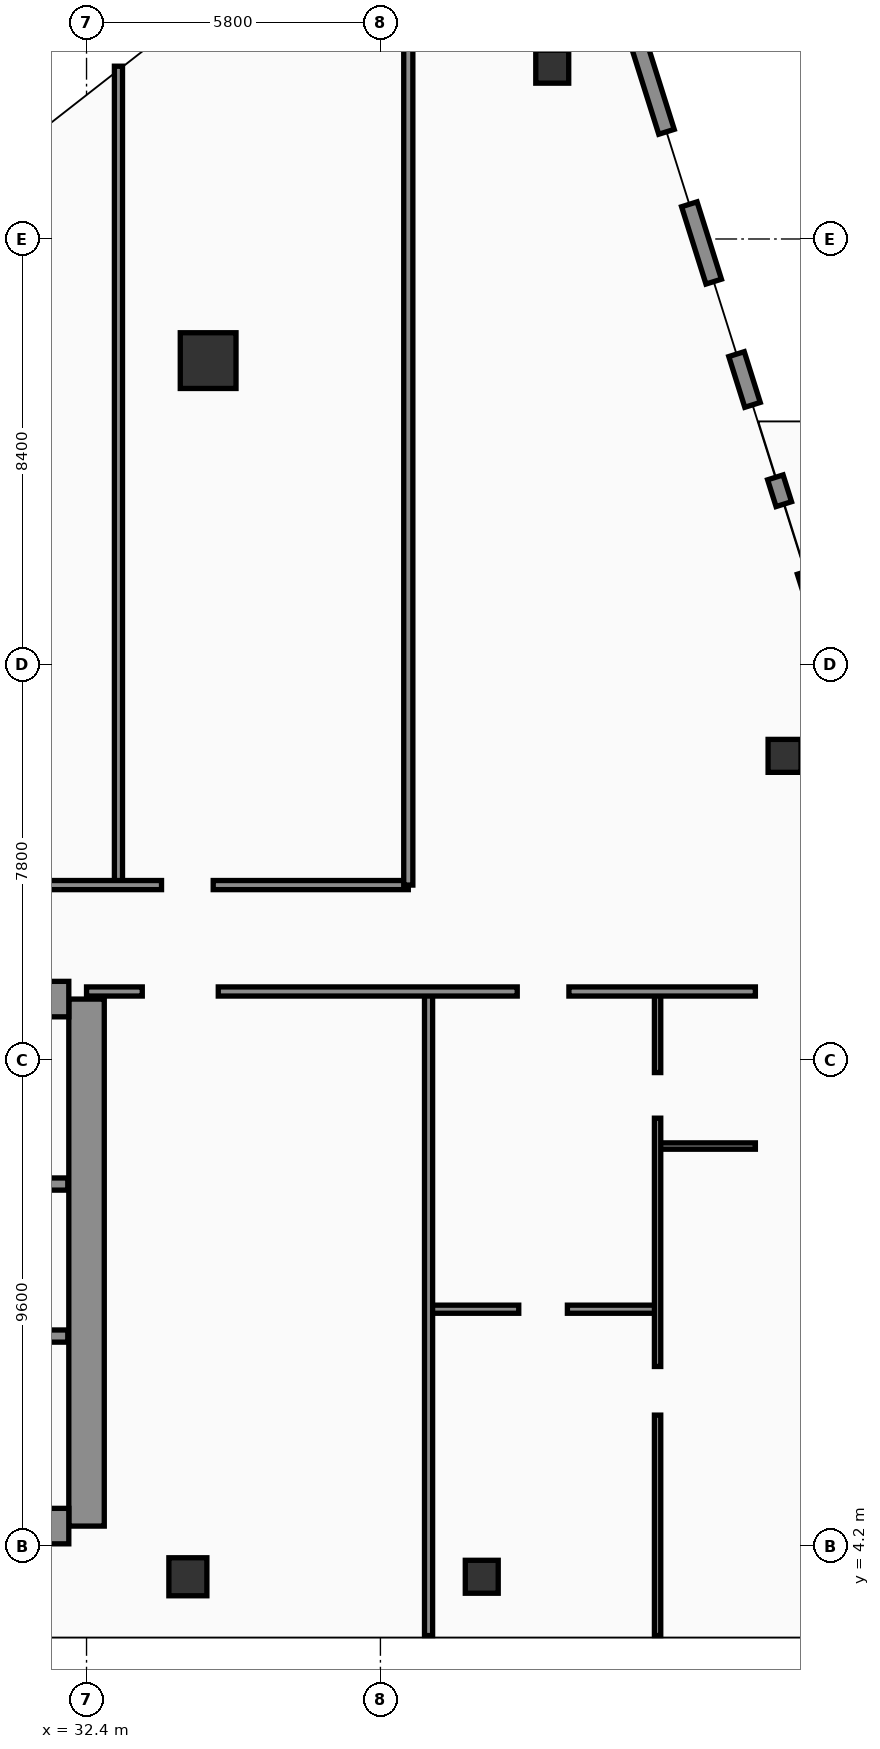
"""IFC4 building model, lengths in metres.
Left out: names, types, materials, properties, quantities, classifications, styles, units other than length and angle.
Written with IfcOpenShell. Run it as: python <this file> out.ifc"""

import sys

from ifc_helpers import new_model, si_unit, direction, frame, frame_2d, origin, origin_2d, place, context, subcontext, project, spatial, rectangle, hollow_rectangle, circle, extrude, element, fill, save


model = new_model("IFC4")
c1 = context("Model", 3, precision=1e-05, world=origin(), true_north=direction((0.0, 1.0)))
c2 = subcontext(c1, "Body", "Model", "MODEL_VIEW")
j1 = project(units=[si_unit("LENGTHUNIT", "METRE"), si_unit("PLANEANGLEUNIT", "RADIAN")], contexts=[c1])
p1 = place(None, origin())
s1 = spatial("IfcSite", under=j1, at=p1, CompositionType="ELEMENT")
p2 = place(p1, origin())
s2 = spatial("IfcBuilding", under=s1, at=p2, CompositionType="ELEMENT")
p3 = place(p2, frame((0.0, 0.0, 211.0)))
s3 = spatial("IfcBuildingStorey", under=s2, at=p3, CompositionType="ELEMENT", Elevation=211.0)
p4 = place(p3, frame((32.4, 4.6, 0.0), z_axis=(0.0, 0.0, 1.0), x_axis=(0.0, 1.0, 0.0)))
e1 = element("IfcWall", 1, at=p4, inside=s3, PredefinedType="SHEAR", context=c2, shape_type="SweptSolid", body=[
    extrude(rectangle(XDim=10.4, YDim=0.7, at=frame_2d((5.2, 0.0))), origin(), (0.0, 0.0, 1.0), 3.56),
])
p5 = place(p3, frame((21.95, 15.0, 0.0), z_axis=(0.0, 0.0, 1.0), x_axis=(1.0, 0.0, 0.0)))
e2 = element("IfcWall", 2, at=p5, inside=s3, PredefinedType="SHEAR", context=c2, shape_type="SweptSolid", body=[
    extrude(rectangle(XDim=10.1, YDim=0.7, at=frame_2d((5.05, 0.0))), origin(), (0.0, 0.0, 1.0), 3.56),
])
p6 = place(p5, frame((4.95, 0.0, 0.0)))
e3 = element("IfcOpeningElement", 3, at=p6, cuts=e2, PredefinedType="OPENING", context=c2, shape_type="SweptSolid", body=[
    extrude(rectangle(XDim=1.1, YDim=2.2, at=frame_2d((0.55, 1.1))), frame((0.0, 0.36, 0.0), z_axis=(0.0, -1.0, 0.0), x_axis=(1.0, 0.0, 0.0)), (0.0, 0.0, 1.0), 0.72),
])
p7 = place(p3, frame((21.95, 4.6, 0.0), z_axis=(0.0, 0.0, 1.0), x_axis=(1.0, 0.0, 0.0)))
e4 = element("IfcWall", 4, at=p7, inside=s3, PredefinedType="SHEAR", context=c2, shape_type="SweptSolid", body=[
    extrude(rectangle(XDim=10.1, YDim=0.7, at=frame_2d((5.05, 0.0))), origin(), (0.0, 0.0, 1.0), 3.56),
])
p8 = place(p3, frame((34.4, 3.6, 0.0), z_axis=(0.0, 0.0, 1.0), x_axis=(1.0, 0.0, 0.0)))
e5 = element("IfcColumn", 5, at=p8, inside=s3, PredefinedType="COLUMN", context=c2, shape_type="SweptSolid", body=[
    extrude(hollow_rectangle(XDim=0.75, YDim=0.75, WallThickness=0.032, at=origin_2d()), origin(), (0.0, 0.0, 1.0), 3.56),
])
p9 = place(p3, frame((40.2, 3.6, 0.0), z_axis=(0.0, 0.0, 1.0), x_axis=(1.0, 0.0, 0.0)))
e6 = element("IfcColumn", 6, at=p9, inside=s3, PredefinedType="COLUMN", context=c2, shape_type="SweptSolid", body=[
    extrude(hollow_rectangle(XDim=0.65, YDim=0.65, WallThickness=0.028, at=origin_2d()), origin(), (0.0, 0.0, 1.0), 3.56),
])
p10 = place(p3, frame((34.8, 27.6, 0.0), z_axis=(0.0, 0.0, 1.0), x_axis=(1.0, 0.0, 0.0)))
e7 = element("IfcColumn", 7, at=p10, inside=s3, PredefinedType="COLUMN", context=c2, shape_type="SweptSolid", body=[
    extrude(circle(Radius=0.55, at=origin_2d()), origin(), (0.0, 0.0, 1.0), 3.56),
])
for number, where, z_axis, x_axis in (
    (8, (46.176, 19.8, 0.0), (0.0, 0.0, 1.0), (1.0, 0.0, 0.0)),
    (9, (41.591, 33.4, 0.0), (0.0, 0.0, 1.0), (1.0, 0.0, 0.0)),
):
    element("IfcColumn", number, at=place(p3, frame(where, z_axis=z_axis, x_axis=x_axis)), inside=s3, PredefinedType="COLUMN", context=c2, shape_type="SweptSolid", body=[
        extrude(hollow_rectangle(XDim=0.65, YDim=0.65, WallThickness=0.028, at=origin_2d()), origin(), (0.0, 0.0, 1.0), 3.56),
    ])
p11 = place(p3, frame((52.23, 5.505, 0.0), z_axis=(0.0, 0.0, 1.0), x_axis=(-0.300509063924, 0.953778958931, 0.0)))
e10 = element("IfcWall", 10, at=p11, inside=s3, PredefinedType="SOLIDWALL", context=c2, shape_type="SweptSolid", body=[
    extrude(rectangle(XDim=30.814, YDim=0.32, at=frame_2d((15.407, 0.0))), origin(), (0.0, 0.0, 1.0), 3.56),
])
p12 = place(p11, frame((18.796, 0.0, 0.0)))
e11 = element("IfcOpeningElement", 11, at=p12, cuts=e10, PredefinedType="OPENING", context=c2, shape_type="SweptSolid", body=[
    extrude(rectangle(XDim=1.4, YDim=2.25, at=frame_2d((0.7, 1.125))), frame((0.0, 0.17, 0.0), z_axis=(0.0, -1.0, 0.0), x_axis=(1.0, 0.0, 0.0)), (0.0, 0.0, 1.0), 0.34),
])
p13 = place(p11, frame((4.437, 0.0, 0.7)))
e12 = element("IfcOpeningElement", 12, at=p13, cuts=e10, PredefinedType="OPENING", context=c2, shape_type="SweptSolid", body=[
    extrude(rectangle(XDim=1.6, YDim=1.65, at=frame_2d((0.8, 0.825))), frame((0.0, 0.17, 0.0), z_axis=(0.0, -1.0, 0.0), x_axis=(1.0, 0.0, 0.0)), (0.0, 0.0, 1.0), 0.34),
])
p14 = place(p11, frame((9.889, 0.0, 0.7)))
e13 = element("IfcOpeningElement", 13, at=p14, cuts=e10, PredefinedType="OPENING", context=c2, shape_type="SweptSolid", body=[
    extrude(rectangle(XDim=1.6, YDim=1.65, at=frame_2d((0.8, 0.825))), frame((0.0, 0.17, 0.0), z_axis=(0.0, -1.0, 0.0), x_axis=(1.0, 0.0, 0.0)), (0.0, 0.0, 1.0), 0.34),
])
p15 = place(p11, frame((1.6, 0.0, 0.75)))
e14 = element("IfcOpeningElement", 14, at=p15, cuts=e10, PredefinedType="OPENING", context=c2, shape_type="SweptSolid", body=[
    extrude(rectangle(XDim=1.5, YDim=1.6, at=frame_2d((0.75, 0.8))), frame((0.0, 0.17, 0.0), z_axis=(0.0, -1.0, 0.0), x_axis=(1.0, 0.0, 0.0)), (0.0, 0.0, 1.0), 0.34),
])
p16 = place(p11, frame((7.8, 0.0, 0.75)))
e15 = element("IfcOpeningElement", 15, at=p16, cuts=e10, PredefinedType="OPENING", context=c2, shape_type="SweptSolid", body=[
    extrude(rectangle(XDim=1.5, YDim=1.6, at=frame_2d((0.75, 0.8))), frame((0.0, 0.17, 0.0), z_axis=(0.0, -1.0, 0.0), x_axis=(1.0, 0.0, 0.0)), (0.0, 0.0, 1.0), 0.34),
])
p17 = place(p11, frame((11.95, 0.0, 0.75)))
e16 = element("IfcOpeningElement", 16, at=p17, cuts=e10, PredefinedType="OPENING", context=c2, shape_type="SweptSolid", body=[
    extrude(rectangle(XDim=1.5, YDim=1.6, at=frame_2d((0.75, 0.8))), frame((0.0, 0.17, 0.0), z_axis=(0.0, -1.0, 0.0), x_axis=(1.0, 0.0, 0.0)), (0.0, 0.0, 1.0), 0.34),
])
p18 = place(p11, frame((14.0, 0.0, 0.75)))
e17 = element("IfcOpeningElement", 17, at=p18, cuts=e10, PredefinedType="OPENING", context=c2, shape_type="SweptSolid", body=[
    extrude(rectangle(XDim=1.5, YDim=1.6, at=frame_2d((0.75, 0.8))), frame((0.0, 0.17, 0.0), z_axis=(0.0, -1.0, 0.0), x_axis=(1.0, 0.0, 0.0)), (0.0, 0.0, 1.0), 0.34),
])
p19 = place(p11, frame((16.55, 0.0, 0.75)))
e18 = element("IfcOpeningElement", 18, at=p19, cuts=e10, PredefinedType="OPENING", context=c2, shape_type="SweptSolid", body=[
    extrude(rectangle(XDim=1.5, YDim=1.6, at=frame_2d((0.75, 0.8))), frame((0.0, 0.17, 0.0), z_axis=(0.0, -1.0, 0.0), x_axis=(1.0, 0.0, 0.0)), (0.0, 0.0, 1.0), 0.34),
])
p20 = place(p11, frame((20.75, 0.0, 0.75)))
e19 = element("IfcOpeningElement", 19, at=p20, cuts=e10, PredefinedType="OPENING", context=c2, shape_type="SweptSolid", body=[
    extrude(rectangle(XDim=1.5, YDim=1.6, at=frame_2d((0.75, 0.8))), frame((0.0, 0.17, 0.0), z_axis=(0.0, -1.0, 0.0), x_axis=(1.0, 0.0, 0.0)), (0.0, 0.0, 1.0), 0.34),
])
p21 = place(p11, frame((23.3, 0.0, 0.75)))
e20 = element("IfcOpeningElement", 20, at=p21, cuts=e10, PredefinedType="OPENING", context=c2, shape_type="SweptSolid", body=[
    extrude(rectangle(XDim=1.5, YDim=1.6, at=frame_2d((0.75, 0.8))), frame((0.0, 0.17, 0.0), z_axis=(0.0, -1.0, 0.0), x_axis=(1.0, 0.0, 0.0)), (0.0, 0.0, 1.0), 0.34),
])
p22 = place(p11, frame((26.4, 0.0, 0.75)))
e21 = element("IfcOpeningElement", 21, at=p22, cuts=e10, PredefinedType="OPENING", context=c2, shape_type="SweptSolid", body=[
    extrude(rectangle(XDim=1.5, YDim=1.6, at=frame_2d((0.75, 0.8))), frame((0.0, 0.17, 0.0), z_axis=(0.0, -1.0, 0.0), x_axis=(1.0, 0.0, 0.0)), (0.0, 0.0, 1.0), 0.34),
])
p23 = place(p3, frame((27.02, 11.35, 0.0), z_axis=(0.0, 0.0, 1.0), x_axis=(1.0, 0.0, 0.0)))
e22 = element("IfcWall", 22, at=p23, inside=s3, PredefinedType="SOLIDWALL", context=c2, shape_type="SweptSolid", body=[
    extrude(rectangle(XDim=5.01, YDim=0.24, at=frame_2d((2.505, 0.0))), origin(), (0.0, 0.0, 1.0), 3.56),
])
p24 = place(p23, frame((0.45, 0.0, 0.0)))
e23 = element("IfcOpeningElement", 23, at=p24, cuts=e22, PredefinedType="OPENING", context=c2, shape_type="SweptSolid", body=[
    extrude(rectangle(XDim=1.3, YDim=2.35, at=frame_2d((0.65, 1.175))), frame((0.0, 0.13, 0.0), z_axis=(0.0, -1.0, 0.0), x_axis=(1.0, 0.0, 0.0)), (0.0, 0.0, 1.0), 0.26),
])
p25 = place(p3, frame((27.02, 8.35, 0.0), z_axis=(0.0, 0.0, 1.0), x_axis=(1.0, 0.0, 0.0)))
e24 = element("IfcWall", 24, at=p25, inside=s3, PredefinedType="SOLIDWALL", context=c2, shape_type="SweptSolid", body=[
    extrude(rectangle(XDim=5.01, YDim=0.24, at=frame_2d((2.505, 0.0))), origin(), (0.0, 0.0, 1.0), 3.09),
])
p26 = place(p3, frame((43.67, 12.1, 0.0), z_axis=(0.0, 0.0, 1.0), x_axis=(1.0, 0.0, 0.0)))
e25 = element("IfcWall", 25, at=p26, inside=s3, PredefinedType="PARTITIONING", context=c2, shape_type="SweptSolid", body=[
    extrude(rectangle(XDim=1.93, YDim=0.125, at=frame_2d((0.965, 0.0))), origin(), (0.0, 0.0, 1.0), 3.56),
])
p27 = place(p3, frame((39.15, 8.88, 0.0), z_axis=(0.0, 0.0, 1.0), x_axis=(1.0, 0.0, 0.0)))
e26 = element("IfcWall", 26, at=p27, inside=s3, PredefinedType="PARTITIONING", context=c2, shape_type="SweptSolid", body=[
    extrude(rectangle(XDim=4.52, YDim=0.16, at=frame_2d((2.26, 0.0))), origin(), (0.0, 0.0, 1.0), 3.09),
])
p28 = place(p27, frame((1.78, 0.0, 0.0)))
e27 = element("IfcOpeningElement", 27, at=p28, cuts=e26, PredefinedType="OPENING", context=c2, shape_type="SweptSolid", body=[
    extrude(rectangle(XDim=0.96, YDim=2.2, at=frame_2d((0.48, 1.1))), frame((0.0, 0.09, 0.0), z_axis=(0.0, -1.0, 0.0), x_axis=(1.0, 0.0, 0.0)), (0.0, 0.0, 1.0), 0.18),
])
p29 = place(p3, frame((43.67, 2.44, 0.0), z_axis=(0.0, 0.0, 1.0), x_axis=(0.0, 1.0, 0.0)))
e28 = element("IfcWall", 28, at=p29, inside=s3, PredefinedType="PARTITIONING", context=c2, shape_type="SweptSolid", body=[
    extrude(rectangle(XDim=12.71, YDim=0.125, at=frame_2d((6.355, 0.0))), origin(), (0.0, 0.0, 1.0), 3.09),
])
p30 = place(p29, frame((4.35, 0.0, 0.0)))
e29 = element("IfcOpeningElement", 29, at=p30, cuts=e28, PredefinedType="OPENING", context=c2, shape_type="SweptSolid", body=[
    extrude(rectangle(XDim=0.96, YDim=2.2, at=frame_2d((0.48, 1.1))), frame((0.0, 0.073, 0.0), z_axis=(0.0, -1.0, 0.0), x_axis=(1.0, 0.0, 0.0)), (0.0, 0.0, 1.0), 0.145),
])
p31 = place(p29, frame((10.21, 0.0, 0.0)))
e30 = element("IfcOpeningElement", 30, at=p31, cuts=e28, PredefinedType="OPENING", context=c2, shape_type="SweptSolid", body=[
    extrude(rectangle(XDim=0.9, YDim=2.15, at=frame_2d((0.45, 1.075))), frame((0.0, 0.073, 0.0), z_axis=(0.0, -1.0, 0.0), x_axis=(1.0, 0.0, 0.0)), (0.0, 0.0, 1.0), 0.145),
])
p32 = place(p3, frame((39.15, 2.44, 0.0), z_axis=(0.0, 0.0, 1.0), x_axis=(0.0, 1.0, 0.0)))
e31 = element("IfcWall", 31, at=p32, inside=s3, PredefinedType="PARTITIONING", context=c2, shape_type="SweptSolid", body=[
    extrude(rectangle(XDim=12.71, YDim=0.16, at=frame_2d((6.355, 0.0))), origin(), (0.0, 0.0, 1.0), 2.94),
])
p33 = place(p3, frame((32.4, 15.15, 0.0), z_axis=(0.0, 0.0, 1.0), x_axis=(1.0, 0.0, 0.0)))
e32 = element("IfcWall", 32, at=p33, inside=s3, PredefinedType="PARTITIONING", context=c2, shape_type="SweptSolid", body=[
    extrude(rectangle(XDim=13.2, YDim=0.18, at=frame_2d((6.6, 0.0))), origin(), (0.0, 0.0, 1.0), 2.94),
])
p34 = place(p33, frame((1.1, 0.0, 0.0)))
e33 = element("IfcOpeningElement", 33, at=p34, cuts=e32, PredefinedType="OPENING", context=c2, shape_type="SweptSolid", body=[
    extrude(rectangle(XDim=1.5, YDim=2.22, at=frame_2d((0.75, 1.11))), frame((0.0, 0.1, 0.0), z_axis=(0.0, -1.0, 0.0), x_axis=(1.0, 0.0, 0.0)), (0.0, 0.0, 1.0), 0.2),
])
p35 = place(p33, frame((8.5, 0.0, 0.0)))
e34 = element("IfcOpeningElement", 34, at=p35, cuts=e32, PredefinedType="OPENING", context=c2, shape_type="SweptSolid", body=[
    extrude(rectangle(XDim=1.02, YDim=2.2, at=frame_2d((0.51, 1.1))), frame((0.0, 0.1, 0.0), z_axis=(0.0, -1.0, 0.0), x_axis=(1.0, 0.0, 0.0)), (0.0, 0.0, 1.0), 0.2),
])
p36 = place(p3, frame((33.03, 17.25, 0.0), z_axis=(0.0, 0.0, 1.0), x_axis=(0.0, 1.0, 0.0)))
e35 = element("IfcWall", 35, at=p36, inside=s3, PredefinedType="PARTITIONING", context=c2, shape_type="SweptSolid", body=[
    extrude(rectangle(XDim=16.16, YDim=0.16, at=frame_2d((8.08, 0.0))), origin(), (0.0, 0.0, 1.0), 2.94),
])
p37 = place(p3, frame((21.5, 17.25, 0.0), z_axis=(0.0, 0.0, 1.0), x_axis=(1.0, 0.0, 0.0)))
e36 = element("IfcWall", 36, at=p37, inside=s3, PredefinedType="PARTITIONING", context=c2, shape_type="SweptSolid", body=[
    extrude(rectangle(XDim=17.25, YDim=0.18, at=frame_2d((8.625, 0.0))), origin(), (0.0, 0.0, 1.0), 2.94),
])
p38 = place(p37, frame((0.95, 0.0, 0.0)))
e37 = element("IfcOpeningElement", 37, at=p38, cuts=e36, PredefinedType="OPENING", context=c2, shape_type="SweptSolid", body=[
    extrude(rectangle(XDim=1.02, YDim=2.2, at=frame_2d((0.51, 1.1))), frame((0.0, 0.1, 0.0), z_axis=(0.0, -1.0, 0.0), x_axis=(1.0, 0.0, 0.0)), (0.0, 0.0, 1.0), 0.2),
])
p39 = place(p37, frame((7.32, 0.0, 0.0)))
e38 = element("IfcOpeningElement", 38, at=p39, cuts=e36, PredefinedType="OPENING", context=c2, shape_type="SweptSolid", body=[
    extrude(rectangle(XDim=1.02, YDim=2.2, at=frame_2d((0.51, 1.1))), frame((0.0, 0.1, 0.0), z_axis=(0.0, -1.0, 0.0), x_axis=(1.0, 0.0, 0.0)), (0.0, 0.0, 1.0), 0.2),
])
p40 = place(p37, frame((12.38, 0.0, 0.0)))
e39 = element("IfcOpeningElement", 39, at=p40, cuts=e36, PredefinedType="OPENING", context=c2, shape_type="SweptSolid", body=[
    extrude(rectangle(XDim=1.02, YDim=2.2, at=frame_2d((0.51, 1.1))), frame((0.0, 0.1, 0.0), z_axis=(0.0, -1.0, 0.0), x_axis=(1.0, 0.0, 0.0)), (0.0, 0.0, 1.0), 0.2),
])
p41 = place(p3, frame((38.75, 17.25, 0.0), z_axis=(0.0, 0.0, 1.0), x_axis=(0.0, 1.0, 0.0)))
e40 = element("IfcWall", 40, at=p41, inside=s3, PredefinedType="PARTITIONING", context=c2, shape_type="SweptSolid", body=[
    extrude(rectangle(XDim=20.63, YDim=0.18, at=frame_2d((10.315, 0.0))), origin(), (0.0, 0.0, 1.0), 2.94),
])
p42 = place(p12, origin())
e41 = element("IfcDoor", 41, at=p42, inside=s3, OperationType="SINGLE_SWING_LEFT", PredefinedType="DOOR", context=c2, shape_type="SweptSolid", body=[
    extrude(rectangle(XDim=1.4, YDim=2.25, at=frame_2d((0.7, 1.125))), frame((0.0, 0.025, 0.0), z_axis=(0.0, -1.0, 0.0), x_axis=(1.0, 0.0, 0.0)), (0.0, 0.0, 1.0), 0.05),
])
fill(e11, e41)
p43 = place(p20, origin())
e42 = element("IfcWindow", 42, at=p43, inside=s3, PartitioningType="SINGLE_PANEL", PredefinedType="WINDOW", context=c2, shape_type="SweptSolid", body=[
    extrude(rectangle(XDim=1.5, YDim=1.6, at=frame_2d((0.75, 0.8))), frame((0.0, 0.03, 0.0), z_axis=(0.0, -1.0, 0.0), x_axis=(1.0, 0.0, 0.0)), (0.0, 0.0, 1.0), 0.06),
])
fill(e19, e42)
p44 = place(p21, origin())
e43 = element("IfcWindow", 43, at=p44, inside=s3, PartitioningType="SINGLE_PANEL", PredefinedType="WINDOW", context=c2, shape_type="SweptSolid", body=[
    extrude(rectangle(XDim=1.5, YDim=1.6, at=frame_2d((0.75, 0.8))), frame((0.0, 0.03, 0.0), z_axis=(0.0, -1.0, 0.0), x_axis=(1.0, 0.0, 0.0)), (0.0, 0.0, 1.0), 0.06),
])
fill(e20, e43)
p45 = place(p22, origin())
e44 = element("IfcWindow", 44, at=p45, inside=s3, PartitioningType="SINGLE_PANEL", PredefinedType="WINDOW", context=c2, shape_type="SweptSolid", body=[
    extrude(rectangle(XDim=1.5, YDim=1.6, at=frame_2d((0.75, 0.8))), frame((0.0, 0.03, 0.0), z_axis=(0.0, -1.0, 0.0), x_axis=(1.0, 0.0, 0.0)), (0.0, 0.0, 1.0), 0.06),
])
fill(e21, e44)
p46 = place(p28, origin())
e45 = element("IfcDoor", 45, at=p46, inside=s3, OperationType="SINGLE_SWING_LEFT", PredefinedType="DOOR", context=c2, shape_type="SweptSolid", body=[
    extrude(rectangle(XDim=0.96, YDim=2.2, at=frame_2d((0.48, 1.1))), frame((0.0, 0.025, 0.0), z_axis=(0.0, -1.0, 0.0), x_axis=(1.0, 0.0, 0.0)), (0.0, 0.0, 1.0), 0.05),
])
fill(e27, e45)
p47 = place(p30, origin())
e46 = element("IfcDoor", 46, at=p47, inside=s3, OperationType="SINGLE_SWING_LEFT", PredefinedType="DOOR", context=c2, shape_type="SweptSolid", body=[
    extrude(rectangle(XDim=0.96, YDim=2.2, at=frame_2d((0.48, 1.1))), frame((0.0, 0.025, 0.0), z_axis=(0.0, -1.0, 0.0), x_axis=(1.0, 0.0, 0.0)), (0.0, 0.0, 1.0), 0.05),
])
fill(e29, e46)
p48 = place(p31, origin())
e47 = element("IfcDoor", 47, at=p48, inside=s3, OperationType="SINGLE_SWING_RIGHT", PredefinedType="DOOR", context=c2, shape_type="SweptSolid", body=[
    extrude(rectangle(XDim=0.9, YDim=2.15, at=frame_2d((0.45, 1.075))), frame((0.0, 0.025, 0.0), z_axis=(0.0, -1.0, 0.0), x_axis=(1.0, 0.0, 0.0)), (0.0, 0.0, 1.0), 0.05),
])
fill(e30, e47)
p49 = place(p34, origin())
e48 = element("IfcDoor", 48, at=p49, inside=s3, OperationType="SINGLE_SWING_LEFT", PredefinedType="DOOR", context=c2, shape_type="SweptSolid", body=[
    extrude(rectangle(XDim=1.5, YDim=2.22, at=frame_2d((0.75, 1.11))), frame((0.0, 0.025, 0.0), z_axis=(0.0, -1.0, 0.0), x_axis=(1.0, 0.0, 0.0)), (0.0, 0.0, 1.0), 0.05),
])
fill(e33, e48)
p50 = place(p35, origin())
e49 = element("IfcDoor", 49, at=p50, inside=s3, OperationType="SINGLE_SWING_RIGHT", PredefinedType="DOOR", context=c2, shape_type="SweptSolid", body=[
    extrude(rectangle(XDim=1.02, YDim=2.2, at=frame_2d((0.51, 1.1))), frame((0.0, 0.025, 0.0), z_axis=(0.0, -1.0, 0.0), x_axis=(1.0, 0.0, 0.0)), (0.0, 0.0, 1.0), 0.05),
])
fill(e34, e49)
p51 = place(p40, origin())
e50 = element("IfcDoor", 50, at=p51, inside=s3, OperationType="SINGLE_SWING_RIGHT", PredefinedType="DOOR", context=c2, shape_type="SweptSolid", body=[
    extrude(rectangle(XDim=1.02, YDim=2.2, at=frame_2d((0.51, 1.1))), frame((0.0, 0.025, 0.0), z_axis=(0.0, -1.0, 0.0), x_axis=(1.0, 0.0, 0.0)), (0.0, 0.0, 1.0), 0.05),
])
fill(e39, e50)
save(model, sys.argv[1])
